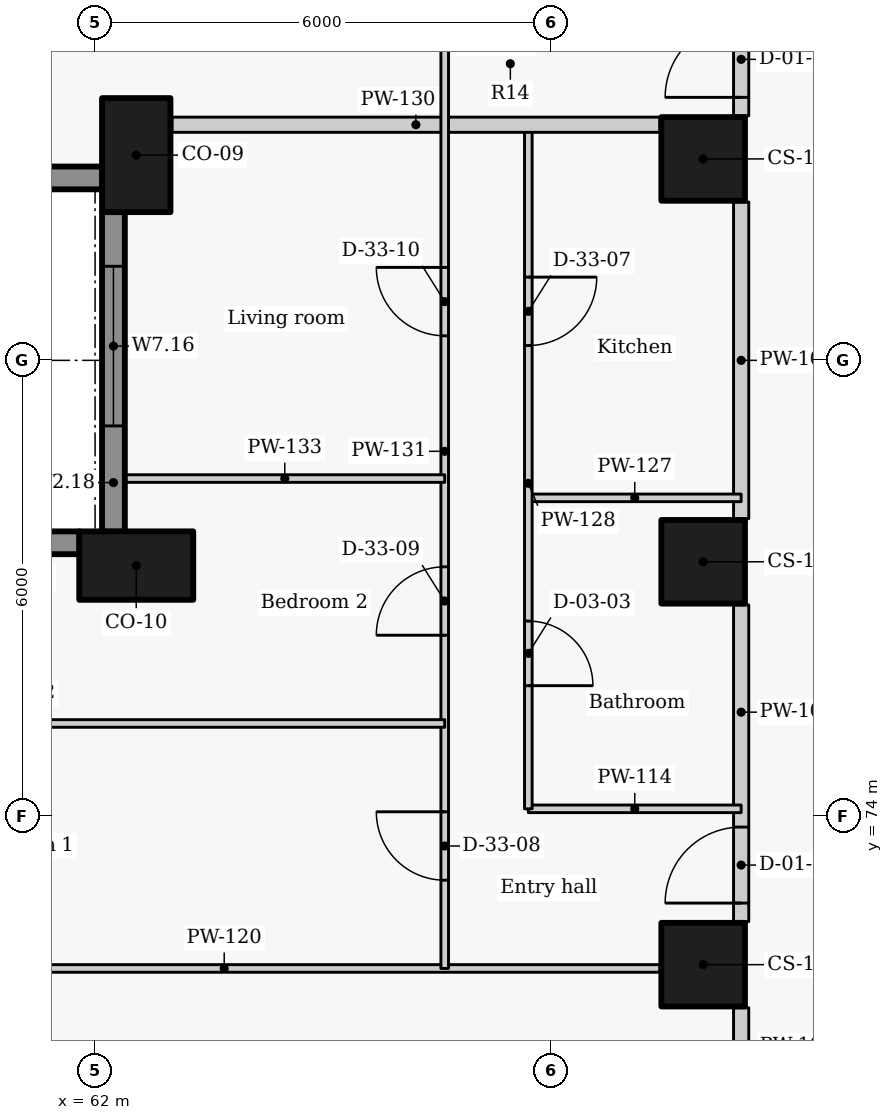
"""IFC4 building model, lengths in metres.
Left out: names, types, materials, properties, quantities, classifications, styles, units other than length and angle.
Written with IfcOpenShell. Run it as: python <this file> out.ifc"""

import sys

from ifc_helpers import new_model, si_unit, direction, frame, frame_2d, origin, origin_2d, place, context, subcontext, project, spatial, rectangle, extrude, element, fill, save


model = new_model("IFC4")
c1 = context("Model", 3, precision=1e-05, world=origin(), true_north=direction((0.0, 1.0)))
c2 = subcontext(c1, "Body", "Model", "MODEL_VIEW")
j1 = project(units=[si_unit("LENGTHUNIT", "METRE"), si_unit("PLANEANGLEUNIT", "RADIAN")], contexts=[c1])
p1 = place(None, origin())
s1 = spatial("IfcSite", under=j1, at=p1, CompositionType="ELEMENT")
p2 = place(p1, origin())
s2 = spatial("IfcBuilding", under=s1, at=p2, CompositionType="ELEMENT")
p3 = place(p2, frame((0.0, 0.0, 44.7)))
s3 = spatial("IfcBuildingStorey", under=s2, at=p3, CompositionType="ELEMENT", Elevation=44.7)
for number, where, z_axis, x_axis in (
    (1, (62.542, 82.7, 0.0), (0.0, 0.0, 1.0), (0.0, -1.0, 0.0)),
    (2, (62.542, 77.3, 0.0), (0.0, 0.0, 1.0), (-1.0, 0.0, 0.0)),
):
    element("IfcColumn", number, at=place(p3, frame(where, z_axis=z_axis, x_axis=x_axis)), inside=s3, PredefinedType="COLUMN", context=c2, shape_type="SweptSolid", body=[
        extrude(rectangle(XDim=1.5, YDim=0.9, at=origin_2d()), origin(), (0.0, 0.0, 1.0), 3.3),
    ])
for number, where, z_axis, x_axis in (
    (3, (70.0, 82.65, 0.0), (0.0, 0.0, 1.0), (0.0, -1.0, 0.0)),
    (4, (70.0, 77.35, 0.0), (0.0, 0.0, 1.0), (0.0, -1.0, 0.0)),
    (5, (70.0, 72.05, 0.0), (0.0, 0.0, 1.0), (0.0, -1.0, 0.0)),
):
    element("IfcColumn", number, at=place(p3, frame(where, z_axis=z_axis, x_axis=x_axis)), inside=s3, PredefinedType="COLUMN", context=c2, shape_type="SweptSolid", body=[
        extrude(rectangle(XDim=1.1, YDim=1.1, at=origin_2d()), origin(), (0.0, 0.0, 1.0), 3.3),
    ])
p4 = place(p3, frame((57.923, 82.4, 0.0), z_axis=(0.0, 0.0, 1.0), x_axis=(1.0, 0.0, 0.0)))
e6 = element("IfcWall", 6, at=p4, inside=s3, PredefinedType="SOLIDWALL", context=c2, shape_type="SweptSolid", body=[
    extrude(rectangle(XDim=4.173, YDim=0.3, at=frame_2d((2.086, 0.0))), origin(), (0.0, 0.0, 1.0), 2.425),
])
p5 = place(p3, frame((62.242, 81.954, 0.0), z_axis=(0.0, 0.0, 1.0), x_axis=(0.0, -1.0, 0.0)))
e7 = element("IfcWall", 7, at=p5, inside=s3, PredefinedType="SOLIDWALL", context=c2, shape_type="SweptSolid", body=[
    extrude(rectangle(XDim=4.208, YDim=0.3, at=frame_2d((2.104, 0.0))), origin(), (0.0, 0.0, 1.0), 2.425),
])
p6 = place(p5, frame((0.716, 0.0, 0.9)))
e8 = element("IfcOpeningElement", 8, at=p6, cuts=e7, PredefinedType="OPENING", context=c2, shape_type="SweptSolid", body=[
    extrude(rectangle(XDim=2.1, YDim=1.1, at=frame_2d((1.05, 0.55))), frame((0.0, 0.16, 0.0), z_axis=(0.0, -1.0, 0.0), x_axis=(1.0, 0.0, 0.0)), (0.0, 0.0, 1.0), 0.32),
])
p7 = place(p3, frame((61.796, 77.6, 0.0), z_axis=(0.0, 0.0, 1.0), x_axis=(-1.0, 0.0, 0.0)))
e9 = element("IfcWall", 9, at=p7, inside=s3, PredefinedType="SOLIDWALL", context=c2, shape_type="SweptSolid", body=[
    extrude(rectangle(XDim=3.873, YDim=0.3, at=frame_2d((1.936, 0.0))), origin(), (0.0, 0.0, 1.0), 2.425),
])
p8 = place(p7, frame((1.186, 0.0, 0.9)))
e10 = element("IfcOpeningElement", 10, at=p8, cuts=e9, PredefinedType="OPENING", context=c2, shape_type="SweptSolid", body=[
    extrude(rectangle(XDim=1.5, YDim=1.1, at=frame_2d((0.75, 0.55))), frame((0.0, 0.16, 0.0), z_axis=(0.0, -1.0, 0.0), x_axis=(1.0, 0.0, 0.0)), (0.0, 0.0, 1.0), 0.32),
])
p9 = place(p3, frame((70.5, 68.267, 0.0), z_axis=(0.0, 0.0, 1.0), x_axis=(0.0, 1.0, 0.0)))
e11 = element("IfcWall", 11, at=p9, inside=s3, PredefinedType="PARTITIONING", context=c2, shape_type="SweptSolid", body=[
    extrude(rectangle(XDim=3.216, YDim=0.2, at=frame_2d((1.608, 0.0))), origin(), (0.0, 0.0, 1.0), 3.025),
])
p10 = place(p9, frame((1.108, 0.0, 0.0)))
e12 = element("IfcOpeningElement", 12, at=p10, cuts=e11, PredefinedType="OPENING", context=c2, shape_type="SweptSolid", body=[
    extrude(rectangle(XDim=1.0, YDim=2.1, at=frame_2d((0.5, 1.05))), frame((0.0, 0.11, 0.0), z_axis=(0.0, -1.0, 0.0), x_axis=(1.0, 0.0, 0.0)), (0.0, 0.0, 1.0), 0.22),
])
p11 = place(p3, frame((70.5, 72.617, 0.0), z_axis=(0.0, 0.0, 1.0), x_axis=(0.0, 1.0, 0.0)))
e13 = element("IfcWall", 13, at=p11, inside=s3, PredefinedType="PARTITIONING", context=c2, shape_type="SweptSolid", body=[
    extrude(rectangle(XDim=4.166, YDim=0.2, at=frame_2d((2.083, 0.0))), origin(), (0.0, 0.0, 1.0), 3.025),
])
p12 = place(p11, frame((0.243, 0.0, 0.0)))
e14 = element("IfcOpeningElement", 14, at=p12, cuts=e13, PredefinedType="OPENING", context=c2, shape_type="SweptSolid", body=[
    extrude(rectangle(XDim=1.0, YDim=2.1, at=frame_2d((0.5, 1.05))), frame((0.0, 0.11, 0.0), z_axis=(0.0, -1.0, 0.0), x_axis=(1.0, 0.0, 0.0)), (0.0, 0.0, 1.0), 0.22),
])
p13 = place(p3, frame((70.5, 77.917, 0.0), z_axis=(0.0, 0.0, 1.0), x_axis=(0.0, 1.0, 0.0)))
e15 = element("IfcWall", 15, at=p13, inside=s3, PredefinedType="PARTITIONING", context=c2, shape_type="SweptSolid", body=[
    extrude(rectangle(XDim=4.166, YDim=0.2, at=frame_2d((2.083, 0.0))), origin(), (0.0, 0.0, 1.0), 3.025),
])
p14 = place(p3, frame((70.5, 83.217, 0.0), z_axis=(0.0, 0.0, 1.0), x_axis=(0.0, 1.0, 0.0)))
e16 = element("IfcWall", 16, at=p14, inside=s3, PredefinedType="PARTITIONING", context=c2, shape_type="SweptSolid", body=[
    extrude(rectangle(XDim=4.166, YDim=0.2, at=frame_2d((2.083, 0.0))), origin(), (0.0, 0.0, 1.0), 3.025),
])
p15 = place(p14, frame((0.243, 0.0, 0.0)))
e17 = element("IfcOpeningElement", 17, at=p15, cuts=e16, PredefinedType="OPENING", context=c2, shape_type="SweptSolid", body=[
    extrude(rectangle(XDim=1.0, YDim=2.1, at=frame_2d((0.5, 1.05))), frame((0.0, 0.11, 0.0), z_axis=(0.0, -1.0, 0.0), x_axis=(1.0, 0.0, 0.0)), (0.0, 0.0, 1.0), 0.22),
])
p16 = place(p3, frame((67.7, 74.1, 0.0), z_axis=(0.0, 0.0, 1.0), x_axis=(1.0, 0.0, 0.0)))
e18 = element("IfcWall", 18, at=p16, inside=s3, PredefinedType="PARTITIONING", context=c2, shape_type="SweptSolid", body=[
    extrude(rectangle(XDim=2.8, YDim=0.1, at=frame_2d((1.4, 0.0))), origin(), (0.0, 0.0, 1.0), 2.505),
])
p17 = place(p3, frame((57.968, 72.0, 0.0), z_axis=(0.0, 0.0, 1.0), x_axis=(1.0, 0.0, 0.0)))
e19 = element("IfcWall", 19, at=p17, inside=s3, PredefinedType="PARTITIONING", context=c2, shape_type="SweptSolid", body=[
    extrude(rectangle(XDim=11.462, YDim=0.1, at=frame_2d((5.731, 0.0))), origin(), (0.0, 0.0, 1.0), 3.025),
])
p18 = place(p3, frame((67.7, 78.191, 0.0), z_axis=(0.0, 0.0, 1.0), x_axis=(1.0, 0.0, 0.0)))
e20 = element("IfcWall", 20, at=p18, inside=s3, PredefinedType="PARTITIONING", context=c2, shape_type="SweptSolid", body=[
    extrude(rectangle(XDim=2.8, YDim=0.1, at=frame_2d((1.4, 0.0))), origin(), (0.0, 0.0, 1.0), 2.505),
])
p19 = place(p3, frame((67.7, 83.1, 0.0), z_axis=(0.0, 0.0, 1.0), x_axis=(0.0, -1.0, 0.0)))
e21 = element("IfcWall", 21, at=p19, inside=s3, PredefinedType="PARTITIONING", context=c2, shape_type="SweptSolid", body=[
    extrude(rectangle(XDim=9.0, YDim=0.1, at=frame_2d((4.5, 0.0))), origin(), (0.0, 0.0, 1.0), 3.025),
])
p20 = place(p19, frame((6.53, 0.0, 0.0)))
e22 = element("IfcOpeningElement", 22, at=p20, cuts=e21, PredefinedType="OPENING", context=c2, shape_type="SweptSolid", body=[
    extrude(rectangle(XDim=0.85, YDim=2.1, at=frame_2d((0.425, 1.05))), frame((0.0, 0.06, 0.0), z_axis=(0.0, -1.0, 0.0), x_axis=(1.0, 0.0, 0.0)), (0.0, 0.0, 1.0), 0.12),
])
p21 = place(p19, frame((2.005, 0.0, 0.0)))
e23 = element("IfcOpeningElement", 23, at=p21, cuts=e21, PredefinedType="OPENING", context=c2, shape_type="SweptSolid", body=[
    extrude(rectangle(XDim=0.9, YDim=2.1, at=frame_2d((0.45, 1.05))), frame((0.0, 0.06, 0.0), z_axis=(0.0, -1.0, 0.0), x_axis=(1.0, 0.0, 0.0)), (0.0, 0.0, 1.0), 0.12),
])
p22 = place(p3, frame((63.012, 83.1, 0.0), z_axis=(0.0, 0.0, 1.0), x_axis=(1.0, 0.0, 0.0)))
e24 = element("IfcWall", 24, at=p22, inside=s3, PredefinedType="PARTITIONING", context=c2, shape_type="SweptSolid", body=[
    extrude(rectangle(XDim=6.418, YDim=0.2, at=frame_2d((3.209, 0.0))), origin(), (0.0, 0.0, 1.0), 3.025),
])
p23 = place(p3, frame((66.6, 72.0, 0.0), z_axis=(0.0, 0.0, 1.0), x_axis=(0.0, 1.0, 0.0)))
e25 = element("IfcWall", 25, at=p23, inside=s3, PredefinedType="PARTITIONING", context=c2, shape_type="SweptSolid", body=[
    extrude(rectangle(XDim=21.9, YDim=0.1, at=frame_2d((10.95, 0.0))), origin(), (0.0, 0.0, 1.0), 3.025),
])
p24 = place(p23, frame((1.161, 0.0, 0.0)))
e26 = element("IfcOpeningElement", 26, at=p24, cuts=e25, PredefinedType="OPENING", context=c2, shape_type="SweptSolid", body=[
    extrude(rectangle(XDim=0.9, YDim=2.1, at=frame_2d((0.45, 1.05))), frame((0.0, 0.06, 0.0), z_axis=(0.0, -1.0, 0.0), x_axis=(1.0, 0.0, 0.0)), (0.0, 0.0, 1.0), 0.12),
])
p25 = place(p23, frame((4.384, 0.0, 0.0)))
e27 = element("IfcOpeningElement", 27, at=p25, cuts=e25, PredefinedType="OPENING", context=c2, shape_type="SweptSolid", body=[
    extrude(rectangle(XDim=0.9, YDim=2.1, at=frame_2d((0.45, 1.05))), frame((0.0, 0.06, 0.0), z_axis=(0.0, -1.0, 0.0), x_axis=(1.0, 0.0, 0.0)), (0.0, 0.0, 1.0), 0.12),
])
p26 = place(p23, frame((8.323, 0.0, 0.0)))
e28 = element("IfcOpeningElement", 28, at=p26, cuts=e25, PredefinedType="OPENING", context=c2, shape_type="SweptSolid", body=[
    extrude(rectangle(XDim=0.9, YDim=2.1, at=frame_2d((0.45, 1.05))), frame((0.0, 0.06, 0.0), z_axis=(0.0, -1.0, 0.0), x_axis=(1.0, 0.0, 0.0)), (0.0, 0.0, 1.0), 0.12),
])
p27 = place(p23, frame((12.218, 0.0, 0.0)))
e29 = element("IfcOpeningElement", 29, at=p27, cuts=e25, PredefinedType="OPENING", context=c2, shape_type="SweptSolid", body=[
    extrude(rectangle(XDim=0.9, YDim=2.1, at=frame_2d((0.45, 1.05))), frame((0.0, 0.06, 0.0), z_axis=(0.0, -1.0, 0.0), x_axis=(1.0, 0.0, 0.0)), (0.0, 0.0, 1.0), 0.12),
])
p28 = place(p23, frame((15.353, 0.0, 0.0)))
e30 = element("IfcOpeningElement", 30, at=p28, cuts=e25, PredefinedType="OPENING", context=c2, shape_type="SweptSolid", body=[
    extrude(rectangle(XDim=0.9, YDim=2.1, at=frame_2d((0.45, 1.05))), frame((0.0, 0.06, 0.0), z_axis=(0.0, -1.0, 0.0), x_axis=(1.0, 0.0, 0.0)), (0.0, 0.0, 1.0), 0.12),
])
p29 = place(p23, frame((19.186, 0.0, 0.0)))
e31 = element("IfcOpeningElement", 31, at=p29, cuts=e25, PredefinedType="OPENING", context=c2, shape_type="SweptSolid", body=[
    extrude(rectangle(XDim=0.9, YDim=2.1, at=frame_2d((0.45, 1.05))), frame((0.0, 0.06, 0.0), z_axis=(0.0, -1.0, 0.0), x_axis=(1.0, 0.0, 0.0)), (0.0, 0.0, 1.0), 0.12),
])
p30 = place(p3, frame((55.392, 75.223, 0.0), z_axis=(0.0, 0.0, 1.0), x_axis=(1.0, 0.0, 0.0)))
e32 = element("IfcWall", 32, at=p30, inside=s3, PredefinedType="PARTITIONING", context=c2, shape_type="SweptSolid", body=[
    extrude(rectangle(XDim=11.208, YDim=0.1, at=frame_2d((5.604, 0.0))), origin(), (0.0, 0.0, 1.0), 2.405),
])
p31 = place(p3, frame((62.392, 78.445, 0.0), z_axis=(0.0, 0.0, 1.0), x_axis=(1.0, 0.0, 0.0)))
e33 = element("IfcWall", 33, at=p31, inside=s3, PredefinedType="PARTITIONING", context=c2, shape_type="SweptSolid", body=[
    extrude(rectangle(XDim=4.208, YDim=0.1, at=frame_2d((2.104, 0.0))), origin(), (0.0, 0.0, 1.0), 2.405),
])
p32 = place(p6, origin())
e34 = element("IfcWindow", 34, at=p32, inside=s3, PartitioningType="SINGLE_PANEL", PredefinedType="WINDOW", context=c2, shape_type="SweptSolid", body=[
    extrude(rectangle(XDim=2.1, YDim=1.1, at=frame_2d((1.05, 0.55))), frame((0.0, 0.03, 0.0), z_axis=(0.0, -1.0, 0.0), x_axis=(1.0, 0.0, 0.0)), (0.0, 0.0, 1.0), 0.06),
])
fill(e8, e34)
p33 = place(p12, origin())
e35 = element("IfcDoor", 35, at=p33, inside=s3, OperationType="SINGLE_SWING_LEFT", PredefinedType="DOOR", context=c2, shape_type="SweptSolid", body=[
    extrude(rectangle(XDim=1.0, YDim=2.1, at=frame_2d((0.5, 1.05))), frame((0.0, 0.025, 0.0), z_axis=(0.0, -1.0, 0.0), x_axis=(1.0, 0.0, 0.0)), (0.0, 0.0, 1.0), 0.05),
])
fill(e14, e35)
p34 = place(p20, origin())
e36 = element("IfcDoor", 36, at=p34, inside=s3, OperationType="SINGLE_SWING_RIGHT", PredefinedType="DOOR", context=c2, shape_type="SweptSolid", body=[
    extrude(rectangle(XDim=0.85, YDim=2.1, at=frame_2d((0.425, 1.05))), frame((0.0, 0.025, 0.0), z_axis=(0.0, -1.0, 0.0), x_axis=(1.0, 0.0, 0.0)), (0.0, 0.0, 1.0), 0.05),
])
fill(e22, e36)
p35 = place(p21, origin())
e37 = element("IfcDoor", 37, at=p35, inside=s3, OperationType="SINGLE_SWING_LEFT", PredefinedType="DOOR", context=c2, shape_type="SweptSolid", body=[
    extrude(rectangle(XDim=0.9, YDim=2.1, at=frame_2d((0.45, 1.05))), frame((0.0, 0.025, 0.0), z_axis=(0.0, -1.0, 0.0), x_axis=(1.0, 0.0, 0.0)), (0.0, 0.0, 1.0), 0.05),
])
fill(e23, e37)
p36 = place(p24, origin())
e38 = element("IfcDoor", 38, at=p36, inside=s3, OperationType="SINGLE_SWING_RIGHT", PredefinedType="DOOR", context=c2, shape_type="SweptSolid", body=[
    extrude(rectangle(XDim=0.9, YDim=2.1, at=frame_2d((0.45, 1.05))), frame((0.0, 0.025, 0.0), z_axis=(0.0, -1.0, 0.0), x_axis=(1.0, 0.0, 0.0)), (0.0, 0.0, 1.0), 0.05),
])
fill(e26, e38)
p37 = place(p25, origin())
e39 = element("IfcDoor", 39, at=p37, inside=s3, OperationType="SINGLE_SWING_LEFT", PredefinedType="DOOR", context=c2, shape_type="SweptSolid", body=[
    extrude(rectangle(XDim=0.9, YDim=2.1, at=frame_2d((0.45, 1.05))), frame((0.0, 0.025, 0.0), z_axis=(0.0, -1.0, 0.0), x_axis=(1.0, 0.0, 0.0)), (0.0, 0.0, 1.0), 0.05),
])
fill(e27, e39)
p38 = place(p26, origin())
e40 = element("IfcDoor", 40, at=p38, inside=s3, OperationType="SINGLE_SWING_RIGHT", PredefinedType="DOOR", context=c2, shape_type="SweptSolid", body=[
    extrude(rectangle(XDim=0.9, YDim=2.1, at=frame_2d((0.45, 1.05))), frame((0.0, 0.025, 0.0), z_axis=(0.0, -1.0, 0.0), x_axis=(1.0, 0.0, 0.0)), (0.0, 0.0, 1.0), 0.05),
])
fill(e28, e40)
p39 = place(p15, origin())
e41 = element("IfcDoor", 41, at=p39, inside=s3, OperationType="SINGLE_SWING_LEFT", PredefinedType="DOOR", context=c2, shape_type="SweptSolid", body=[
    extrude(rectangle(XDim=1.0, YDim=2.1, at=frame_2d((0.5, 1.05))), frame((0.0, 0.025, 0.0), z_axis=(0.0, -1.0, 0.0), x_axis=(1.0, 0.0, 0.0)), (0.0, 0.0, 1.0), 0.05),
])
fill(e17, e41)
save(model, sys.argv[1])
